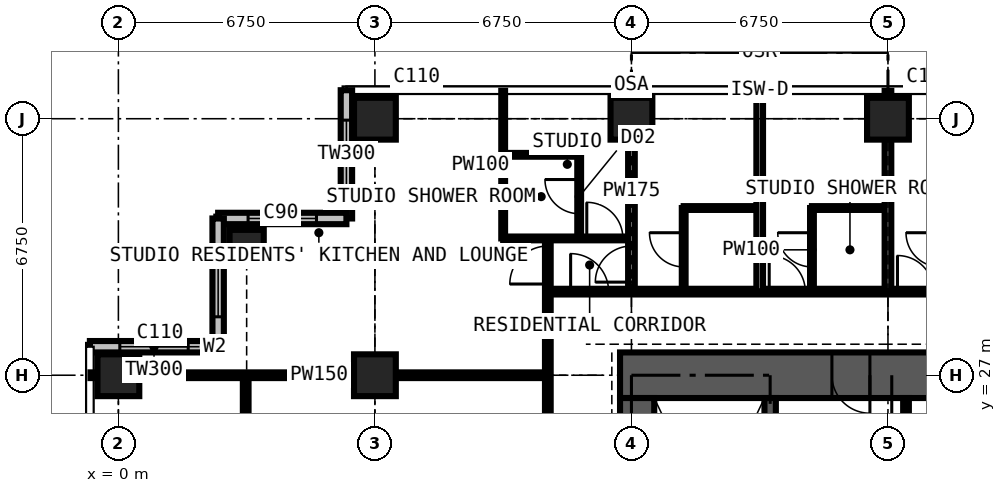
"""IFC4 building model, lengths in metres.
Left out: names, types, materials, properties, quantities, classifications, styles, units other than length and angle.
Written with IfcOpenShell. Run it as: python <this file> out.ifc"""

import sys

from ifc_helpers import new_model, si_unit, direction, frame, frame_2d, origin, origin_2d, place, context, subcontext, project, spatial, rectangle, extrude, element, fill, save


model = new_model("IFC4")
c1 = context("Model", 3, precision=1e-05, world=origin(), true_north=direction((0.0, 1.0)))
c2 = subcontext(c1, "Body", "Model", "MODEL_VIEW")
j1 = project(units=[si_unit("LENGTHUNIT", "METRE"), si_unit("PLANEANGLEUNIT", "RADIAN")], contexts=[c1])
p1 = place(None, origin())
s1 = spatial("IfcSite", under=j1, at=p1, CompositionType="ELEMENT")
p2 = place(p1, origin())
s2 = spatial("IfcBuilding", under=s1, at=p2, CompositionType="ELEMENT")
p3 = place(p2, frame((0.0, 0.0, 222.3)))
s3 = spatial("IfcBuildingStorey", under=s2, at=p3, CompositionType="ELEMENT", Elevation=222.3)
p4 = place(p3, frame((0.0, 27.0, 0.0), z_axis=(0.0, 0.0, 1.0), x_axis=(1.0, 0.0, 0.0)))
e1 = element("IfcColumn", 1, at=p4, inside=s3, PredefinedType="COLUMN", context=c2, shape_type="SweptSolid", body=[
    extrude(rectangle(XDim=1.1, YDim=1.1, at=origin_2d()), origin(), (0.0, 0.0, 1.0), 3.6),
])
p5 = place(p3, frame((3.375, 30.375, 0.0), z_axis=(0.0, 0.0, 1.0), x_axis=(1.0, 0.0, 0.0)))
e2 = element("IfcColumn", 2, at=p5, inside=s3, PredefinedType="COLUMN", context=c2, shape_type="SweptSolid", body=[
    extrude(rectangle(XDim=0.9, YDim=0.9, at=origin_2d()), origin(), (0.0, 0.0, 1.0), 3.6),
])
for number, where, z_axis, x_axis in (
    (3, (6.75, 27.0, 0.0), (0.0, 0.0, 1.0), (1.0, 0.0, 0.0)),
    (4, (6.75, 33.75, 0.0), (0.0, 0.0, 1.0), (1.0, 0.0, 0.0)),
    (5, (13.5, 33.75, 0.0), (0.0, 0.0, 1.0), (1.0, 0.0, 0.0)),
    (6, (20.25, 33.75, 0.0), (0.0, 0.0, 1.0), (1.0, 0.0, 0.0)),
):
    element("IfcColumn", number, at=place(p3, frame(where, z_axis=z_axis, x_axis=x_axis)), inside=s3, PredefinedType="COLUMN", context=c2, shape_type="SweptSolid", body=[
        extrude(rectangle(XDim=1.1, YDim=1.1, at=origin_2d()), origin(), (0.0, 0.0, 1.0), 3.6),
    ])
p6 = place(p3, frame((27.3, 27.0, 0.0), z_axis=(0.0, 0.0, 1.0), x_axis=(-1.0, 0.0, 0.0)))
e7 = element("IfcWall", 7, at=p6, inside=s3, PredefinedType="SHEAR", context=c2, shape_type="SweptSolid", body=[
    extrude(rectangle(XDim=14.1, YDim=1.2, at=frame_2d((7.05, 0.0))), origin(), (0.0, 0.0, 1.0), 3.6),
])
p7 = place(p6, frame((4.55, 0.0, 0.0)))
e8 = element("IfcOpeningElement", 8, at=p7, cuts=e7, PredefinedType="OPENING", context=c2, shape_type="SweptSolid", body=[
    extrude(rectangle(XDim=0.9, YDim=2.2, at=frame_2d((0.45, 1.1))), frame((0.0, 0.61, 0.0), z_axis=(0.0, -1.0, 0.0), x_axis=(1.0, 0.0, 0.0)), (0.0, 0.0, 1.0), 1.22),
])
p8 = place(p6, frame((7.525, 0.0, 0.0)))
e9 = element("IfcOpeningElement", 9, at=p8, cuts=e7, PredefinedType="OPENING", context=c2, shape_type="SweptSolid", body=[
    extrude(rectangle(XDim=1.0, YDim=2.2, at=frame_2d((0.5, 1.1))), frame((0.0, 0.61, 0.0), z_axis=(0.0, -1.0, 0.0), x_axis=(1.0, 0.0, 0.0)), (0.0, 0.0, 1.0), 1.22),
])
p9 = place(p3, frame((13.65, 26.4, 0.0), z_axis=(0.0, 0.0, 1.0), x_axis=(0.0, -1.0, 0.0)))
e10 = element("IfcWall", 10, at=p9, inside=s3, PredefinedType="SHEAR", context=c2, shape_type="SweptSolid", body=[
    extrude(rectangle(XDim=12.3, YDim=0.9, at=frame_2d((6.15, 0.0))), origin(), (0.0, 0.0, 1.0), 3.6),
])
p10 = place(p9, frame((7.45, 0.0, 0.0)))
e11 = element("IfcOpeningElement", 11, at=p10, cuts=e10, PredefinedType="OPENING", context=c2, shape_type="SweptSolid", body=[
    extrude(rectangle(XDim=1.2, YDim=2.2, at=frame_2d((0.6, 1.1))), frame((0.0, 0.46, 0.0), z_axis=(0.0, -1.0, 0.0), x_axis=(1.0, 0.0, 0.0)), (0.0, 0.0, 1.0), 0.92),
])
p11 = place(p3, frame((6.0, 34.5, 0.0), z_axis=(0.0, 0.0, 1.0), x_axis=(0.0, -1.0, 0.0)))
e12 = element("IfcWall", 12, at=p11, inside=s3, PredefinedType="SOLIDWALL", context=c2, shape_type="SweptSolid", body=[
    extrude(rectangle(XDim=3.375, YDim=0.3, at=frame_2d((1.688, 0.0))), origin(), (0.0, 0.0, 1.0), 3.375),
])
p12 = place(p11, frame((0.788, 0.0, 0.6)))
e13 = element("IfcOpeningElement", 13, at=p12, cuts=e12, PredefinedType="OPENING", context=c2, shape_type="SweptSolid", body=[
    extrude(rectangle(XDim=1.8, YDim=2.1, at=frame_2d((0.9, 1.05))), frame((0.0, 0.16, 0.0), z_axis=(0.0, -1.0, 0.0), x_axis=(1.0, 0.0, 0.0)), (0.0, 0.0, 1.0), 0.32),
])
p13 = place(p3, frame((6.0, 31.125, 0.0), z_axis=(0.0, 0.0, 1.0), x_axis=(-1.0, 0.0, 0.0)))
e14 = element("IfcWall", 14, at=p13, inside=s3, PredefinedType="SOLIDWALL", context=c2, shape_type="SweptSolid", body=[
    extrude(rectangle(XDim=3.375, YDim=0.3, at=frame_2d((1.688, 0.0))), origin(), (0.0, 0.0, 1.0), 3.375),
])
p14 = place(p13, frame((0.788, 0.0, 0.6)))
e15 = element("IfcOpeningElement", 15, at=p14, cuts=e14, PredefinedType="OPENING", context=c2, shape_type="SweptSolid", body=[
    extrude(rectangle(XDim=1.8, YDim=2.1, at=frame_2d((0.9, 1.05))), frame((0.0, 0.16, 0.0), z_axis=(0.0, -1.0, 0.0), x_axis=(1.0, 0.0, 0.0)), (0.0, 0.0, 1.0), 0.32),
])
p15 = place(p3, frame((2.625, 31.125, 0.0), z_axis=(0.0, 0.0, 1.0), x_axis=(0.0, -1.0, 0.0)))
e16 = element("IfcWall", 16, at=p15, inside=s3, PredefinedType="SOLIDWALL", context=c2, shape_type="SweptSolid", body=[
    extrude(rectangle(XDim=3.375, YDim=0.3, at=frame_2d((1.688, 0.0))), origin(), (0.0, 0.0, 1.0), 3.375),
])
p16 = place(p15, frame((0.788, 0.0, 0.6)))
e17 = element("IfcOpeningElement", 17, at=p16, cuts=e16, PredefinedType="OPENING", context=c2, shape_type="SweptSolid", body=[
    extrude(rectangle(XDim=1.8, YDim=2.1, at=frame_2d((0.9, 1.05))), frame((0.0, 0.16, 0.0), z_axis=(0.0, -1.0, 0.0), x_axis=(1.0, 0.0, 0.0)), (0.0, 0.0, 1.0), 0.32),
])
p17 = place(p3, frame((2.625, 27.75, 0.0), z_axis=(0.0, 0.0, 1.0), x_axis=(-1.0, 0.0, 0.0)))
e18 = element("IfcWall", 18, at=p17, inside=s3, PredefinedType="SOLIDWALL", context=c2, shape_type="SweptSolid", body=[
    extrude(rectangle(XDim=3.375, YDim=0.3, at=frame_2d((1.688, 0.0))), origin(), (0.0, 0.0, 1.0), 3.375),
])
p18 = place(p17, frame((0.788, 0.0, 0.6)))
e19 = element("IfcOpeningElement", 19, at=p18, cuts=e18, PredefinedType="OPENING", context=c2, shape_type="SweptSolid", body=[
    extrude(rectangle(XDim=1.8, YDim=2.1, at=frame_2d((0.9, 1.05))), frame((0.0, 0.16, 0.0), z_axis=(0.0, -1.0, 0.0), x_axis=(1.0, 0.0, 0.0)), (0.0, 0.0, 1.0), 0.32),
])
p19 = place(p3, frame((17.15, 20.3, 0.0), z_axis=(0.0, 0.0, 1.0), x_axis=(0.0, 1.0, 0.0)))
e20 = element("IfcWall", 20, at=p19, inside=s3, PredefinedType="SHEAR", context=c2, shape_type="SweptSolid", body=[
    extrude(rectangle(XDim=6.1, YDim=0.3, at=frame_2d((3.05, 0.0))), origin(), (0.0, 0.0, 1.0), 3.6),
])
p20 = place(p3, frame((20.725, 23.4, 0.0), z_axis=(0.0, 0.0, 1.0), x_axis=(0.0, 1.0, 0.0)))
e21 = element("IfcWall", 21, at=p20, inside=s3, PredefinedType="PARTITIONING", context=c2, shape_type="SweptSolid", body=[
    extrude(rectangle(XDim=3.0, YDim=0.15, at=frame_2d((1.5, 0.0))), origin(), (0.0, 0.0, 1.0), 3.375),
])
p21 = place(p3, frame((-0.734, 27.0, 0.0), z_axis=(0.0, 0.0, 1.0), x_axis=(1.0, 0.0, 0.0)))
e22 = element("IfcWall", 22, at=p21, inside=s3, PredefinedType="PARTITIONING", context=c2, shape_type="SweptSolid", body=[
    extrude(rectangle(XDim=12.034, YDim=0.15, at=frame_2d((6.017, 0.0))), origin(), (0.0, 0.0, 1.0), 2.877),
])
p22 = place(p3, frame((3.35, 13.5, 0.0), z_axis=(0.0, 0.0, 1.0), x_axis=(0.0, 1.0, 0.0)))
e23 = element("IfcWall", 23, at=p22, inside=s3, PredefinedType="PARTITIONING", context=c2, shape_type="SweptSolid", body=[
    extrude(rectangle(XDim=13.5, YDim=0.15, at=frame_2d((6.75, 0.0))), origin(), (0.0, 0.0, 1.0), 3.375),
])
p23 = place(p22, frame((4.2, 0.0, 0.0)))
e24 = element("IfcOpeningElement", 24, at=p23, cuts=e23, PredefinedType="OPENING", context=c2, shape_type="SweptSolid", body=[
    extrude(rectangle(XDim=0.95, YDim=2.2, at=frame_2d((0.475, 1.1))), frame((0.0, 0.085, 0.0), z_axis=(0.0, -1.0, 0.0), x_axis=(1.0, 0.0, 0.0)), (0.0, 0.0, 1.0), 0.17),
])
p24 = place(p22, frame((10.95, 0.0, 0.0)))
e25 = element("IfcOpeningElement", 25, at=p24, cuts=e23, PredefinedType="OPENING", context=c2, shape_type="SweptSolid", body=[
    extrude(rectangle(XDim=0.95, YDim=2.2, at=frame_2d((0.475, 1.1))), frame((0.0, 0.085, 0.0), z_axis=(0.0, -1.0, 0.0), x_axis=(1.0, 0.0, 0.0)), (0.0, 0.0, 1.0), 0.17),
])
p25 = place(p3, frame((10.125, 30.6, 0.0), z_axis=(0.0, 0.0, 1.0), x_axis=(0.0, 1.0, 0.0)))
e26 = element("IfcWall", 26, at=p25, inside=s3, PredefinedType="PARTITIONING", context=c2, shape_type="SweptSolid", body=[
    extrude(rectangle(XDim=3.884, YDim=0.1, at=frame_2d((1.942, 0.0))), origin(), (0.0, 0.0, 1.0), 3.375),
])
p26 = place(p3, frame((10.125, 30.6, 0.0), z_axis=(0.0, 0.0, 1.0), x_axis=(1.0, 0.0, 0.0)))
e27 = element("IfcWall", 27, at=p26, inside=s3, PredefinedType="PARTITIONING", context=c2, shape_type="SweptSolid", body=[
    extrude(rectangle(XDim=3.375, YDim=0.1, at=frame_2d((1.688, 0.0))), origin(), (0.0, 0.0, 1.0), 3.375),
])
p27 = place(p26, frame((2.2, 0.0, 0.0)))
e28 = element("IfcOpeningElement", 28, at=p27, cuts=e27, PredefinedType="OPENING", context=c2, shape_type="SweptSolid", body=[
    extrude(rectangle(XDim=0.95, YDim=2.2, at=frame_2d((0.475, 1.1))), frame((0.0, 0.06, 0.0), z_axis=(0.0, -1.0, 0.0), x_axis=(1.0, 0.0, 0.0)), (0.0, 0.0, 1.0), 0.12),
])
p28 = place(p3, frame((10.125, 32.8, 0.0), z_axis=(0.0, 0.0, 1.0), x_axis=(1.0, 0.0, 0.0)))
e29 = element("IfcWall", 29, at=p28, inside=s3, PredefinedType="PARTITIONING", context=c2, shape_type="SweptSolid", body=[
    extrude(rectangle(XDim=2.0, YDim=0.1, at=frame_2d((1.0, 0.0))), origin(), (0.0, 0.0, 1.0), 3.375),
])
p29 = place(p3, frame((11.3, 11.3, 0.0), z_axis=(0.0, 0.0, 1.0), x_axis=(0.0, 1.0, 0.0)))
e30 = element("IfcWall", 30, at=p29, inside=s3, PredefinedType="PARTITIONING", context=c2, shape_type="SweptSolid", body=[
    extrude(rectangle(XDim=19.3, YDim=0.15, at=frame_2d((9.65, 0.0))), origin(), (0.0, 0.0, 1.0), 3.375),
])
p30 = place(p29, frame((18.1, 0.0, 0.0)))
e31 = element("IfcOpeningElement", 31, at=p30, cuts=e30, PredefinedType="OPENING", context=c2, shape_type="SweptSolid", body=[
    extrude(rectangle(XDim=1.0, YDim=2.2, at=frame_2d((0.5, 1.1))), frame((0.0, 0.085, 0.0), z_axis=(0.0, -1.0, 0.0), x_axis=(1.0, 0.0, 0.0)), (0.0, 0.0, 1.0), 0.17),
])
p31 = place(p29, frame((12.137, 0.0, 0.0)))
e32 = element("IfcOpeningElement", 32, at=p31, cuts=e30, PredefinedType="OPENING", context=c2, shape_type="SweptSolid", body=[
    extrude(rectangle(XDim=1.0, YDim=2.2, at=frame_2d((0.5, 1.1))), frame((0.0, 0.085, 0.0), z_axis=(0.0, -1.0, 0.0), x_axis=(1.0, 0.0, 0.0)), (0.0, 0.0, 1.0), 0.17),
])
p32 = place(p3, frame((11.3, 29.2, 0.0), z_axis=(0.0, 0.0, 1.0), x_axis=(1.0, 0.0, 0.0)))
e33 = element("IfcWall", 33, at=p32, inside=s3, PredefinedType="PARTITIONING", context=c2, shape_type="SweptSolid", body=[
    extrude(rectangle(XDim=19.809, YDim=0.15, at=frame_2d((9.904, 0.0))), origin(), (0.0, 0.0, 1.0), 3.375),
])
p33 = place(p32, frame((16.3, 0.0, 0.0)))
e34 = element("IfcOpeningElement", 34, at=p33, cuts=e33, PredefinedType="OPENING", context=c2, shape_type="SweptSolid", body=[
    extrude(rectangle(XDim=1.0, YDim=2.2, at=frame_2d((0.5, 1.1))), frame((0.0, 0.085, 0.0), z_axis=(0.0, -1.0, 0.0), x_axis=(1.0, 0.0, 0.0)), (0.0, 0.0, 1.0), 0.17),
])
p34 = place(p32, frame((5.825, 0.0, 0.0)))
e35 = element("IfcOpeningElement", 35, at=p34, cuts=e33, PredefinedType="OPENING", context=c2, shape_type="SweptSolid", body=[
    extrude(rectangle(XDim=0.95, YDim=2.2, at=frame_2d((0.475, 1.1))), frame((0.0, 0.085, 0.0), z_axis=(0.0, -1.0, 0.0), x_axis=(1.0, 0.0, 0.0)), (0.0, 0.0, 1.0), 0.17),
])
p35 = place(p32, frame((9.2, 0.0, 0.0)))
e36 = element("IfcOpeningElement", 36, at=p35, cuts=e33, PredefinedType="OPENING", context=c2, shape_type="SweptSolid", body=[
    extrude(rectangle(XDim=0.95, YDim=2.2, at=frame_2d((0.475, 1.1))), frame((0.0, 0.085, 0.0), z_axis=(0.0, -1.0, 0.0), x_axis=(1.0, 0.0, 0.0)), (0.0, 0.0, 1.0), 0.17),
])
p36 = place(p32, frame((12.575, 0.0, 0.0)))
e37 = element("IfcOpeningElement", 37, at=p36, cuts=e33, PredefinedType="OPENING", context=c2, shape_type="SweptSolid", body=[
    extrude(rectangle(XDim=0.95, YDim=2.2, at=frame_2d((0.475, 1.1))), frame((0.0, 0.085, 0.0), z_axis=(0.0, -1.0, 0.0), x_axis=(1.0, 0.0, 0.0)), (0.0, 0.0, 1.0), 0.17),
])
p37 = place(p32, frame((0.6, 0.0, 0.0)))
e38 = element("IfcOpeningElement", 38, at=p37, cuts=e33, PredefinedType="OPENING", context=c2, shape_type="SweptSolid", body=[
    extrude(rectangle(XDim=1.0, YDim=2.2, at=frame_2d((0.5, 1.1))), frame((0.0, 0.085, 0.0), z_axis=(0.0, -1.0, 0.0), x_axis=(1.0, 0.0, 0.0)), (0.0, 0.0, 1.0), 0.17),
])
p38 = place(p3, frame((12.125, 30.6, 0.0), z_axis=(0.0, 0.0, 1.0), x_axis=(0.0, 1.0, 0.0)))
e39 = element("IfcWall", 39, at=p38, inside=s3, PredefinedType="PARTITIONING", context=c2, shape_type="SweptSolid", body=[
    extrude(rectangle(XDim=2.2, YDim=0.1, at=frame_2d((1.1, 0.0))), origin(), (0.0, 0.0, 1.0), 3.375),
])
p39 = place(p38, frame((0.65, 0.0, 0.0)))
e40 = element("IfcOpeningElement", 40, at=p39, cuts=e39, PredefinedType="OPENING", context=c2, shape_type="SweptSolid", body=[
    extrude(rectangle(XDim=0.9, YDim=2.2, at=frame_2d((0.45, 1.1))), frame((0.0, 0.06, 0.0), z_axis=(0.0, -1.0, 0.0), x_axis=(1.0, 0.0, 0.0)), (0.0, 0.0, 1.0), 0.12),
])
p40 = place(p3, frame((13.5, 29.2, 0.0), z_axis=(0.0, 0.0, 1.0), x_axis=(0.0, 1.0, 0.0)))
e41 = element("IfcWall", 41, at=p40, inside=s3, PredefinedType="PARTITIONING", context=c2, shape_type="SweptSolid", body=[
    extrude(rectangle(XDim=5.284, YDim=0.175, at=frame_2d((2.642, 0.0))), origin(), (0.0, 0.0, 1.0), 2.61),
])
p41 = place(p40, frame((0.25, 0.0, 0.0)))
e42 = element("IfcOpeningElement", 42, at=p41, cuts=e41, PredefinedType="OPENING", context=c2, shape_type="SweptSolid", body=[
    extrude(rectangle(XDim=0.95, YDim=2.2, at=frame_2d((0.475, 1.1))), frame((0.0, 0.097, 0.0), z_axis=(0.0, -1.0, 0.0), x_axis=(1.0, 0.0, 0.0)), (0.0, 0.0, 1.0), 0.195),
])
p42 = place(p3, frame((14.875, 29.2, 0.0), z_axis=(0.0, 0.0, 1.0), x_axis=(0.0, 1.0, 0.0)))
e43 = element("IfcWall", 43, at=p42, inside=s3, PredefinedType="PARTITIONING", context=c2, shape_type="SweptSolid", body=[
    extrude(rectangle(XDim=2.2, YDim=0.1, at=frame_2d((1.1, 0.0))), origin(), (0.0, 0.0, 1.0), 3.375),
])
p43 = place(p42, frame((0.65, 0.0, 0.0)))
e44 = element("IfcOpeningElement", 44, at=p43, cuts=e43, PredefinedType="OPENING", context=c2, shape_type="SweptSolid", body=[
    extrude(rectangle(XDim=0.9, YDim=2.2, at=frame_2d((0.45, 1.1))), frame((0.0, 0.06, 0.0), z_axis=(0.0, -1.0, 0.0), x_axis=(1.0, 0.0, 0.0)), (0.0, 0.0, 1.0), 0.12),
])
p44 = place(p3, frame((14.875, 31.4, 0.0), z_axis=(0.0, 0.0, 1.0), x_axis=(1.0, 0.0, 0.0)))
e45 = element("IfcWall", 45, at=p44, inside=s3, PredefinedType="PARTITIONING", context=c2, shape_type="SweptSolid", body=[
    extrude(rectangle(XDim=2.0, YDim=0.1, at=frame_2d((1.0, 0.0))), origin(), (0.0, 0.0, 1.0), 3.375),
])
p45 = place(p3, frame((16.875, 29.2, 0.0), z_axis=(0.0, 0.0, 1.0), x_axis=(0.0, 1.0, 0.0)))
e46 = element("IfcWall", 46, at=p45, inside=s3, PredefinedType="PARTITIONING", context=c2, shape_type="SweptSolid", body=[
    extrude(rectangle(XDim=5.284, YDim=0.175, at=frame_2d((2.642, 0.0))), origin(), (0.0, 0.0, 1.0), 3.375),
])
p46 = place(p3, frame((18.25, 29.2, 0.0), z_axis=(0.0, 0.0, 1.0), x_axis=(0.0, 1.0, 0.0)))
e47 = element("IfcWall", 47, at=p46, inside=s3, PredefinedType="PARTITIONING", context=c2, shape_type="SweptSolid", body=[
    extrude(rectangle(XDim=2.2, YDim=0.1, at=frame_2d((1.1, 0.0))), origin(), (0.0, 0.0, 1.0), 3.375),
])
p47 = place(p46, frame((0.65, 0.0, 0.0)))
e48 = element("IfcOpeningElement", 48, at=p47, cuts=e47, PredefinedType="OPENING", context=c2, shape_type="SweptSolid", body=[
    extrude(rectangle(XDim=0.9, YDim=2.2, at=frame_2d((0.45, 1.1))), frame((0.0, 0.06, 0.0), z_axis=(0.0, -1.0, 0.0), x_axis=(1.0, 0.0, 0.0)), (0.0, 0.0, 1.0), 0.12),
])
p48 = place(p3, frame((18.25, 31.4, 0.0), z_axis=(0.0, 0.0, 1.0), x_axis=(1.0, 0.0, 0.0)))
e49 = element("IfcWall", 49, at=p48, inside=s3, PredefinedType="PARTITIONING", context=c2, shape_type="SweptSolid", body=[
    extrude(rectangle(XDim=2.0, YDim=0.1, at=frame_2d((1.0, 0.0))), origin(), (0.0, 0.0, 1.0), 3.375),
])
p49 = place(p3, frame((20.25, 29.2, 0.0), z_axis=(0.0, 0.0, 1.0), x_axis=(0.0, 1.0, 0.0)))
e50 = element("IfcWall", 50, at=p49, inside=s3, PredefinedType="PARTITIONING", context=c2, shape_type="SweptSolid", body=[
    extrude(rectangle(XDim=5.284, YDim=0.175, at=frame_2d((2.642, 0.0))), origin(), (0.0, 0.0, 1.0), 2.61),
])
p50 = place(p12, origin())
e51 = element("IfcWindow", 51, at=p50, inside=s3, PartitioningType="SINGLE_PANEL", PredefinedType="WINDOW", context=c2, shape_type="SweptSolid", body=[
    extrude(rectangle(XDim=1.8, YDim=2.1, at=frame_2d((0.9, 1.05))), frame((0.0, 0.03, 0.0), z_axis=(0.0, -1.0, 0.0), x_axis=(1.0, 0.0, 0.0)), (0.0, 0.0, 1.0), 0.06),
])
fill(e13, e51)
p51 = place(p14, origin())
e52 = element("IfcWindow", 52, at=p51, inside=s3, PartitioningType="SINGLE_PANEL", PredefinedType="WINDOW", context=c2, shape_type="SweptSolid", body=[
    extrude(rectangle(XDim=1.8, YDim=2.1, at=frame_2d((0.9, 1.05))), frame((0.0, 0.03, 0.0), z_axis=(0.0, -1.0, 0.0), x_axis=(1.0, 0.0, 0.0)), (0.0, 0.0, 1.0), 0.06),
])
fill(e15, e52)
p52 = place(p16, origin())
e53 = element("IfcWindow", 53, at=p52, inside=s3, PartitioningType="SINGLE_PANEL", PredefinedType="WINDOW", context=c2, shape_type="SweptSolid", body=[
    extrude(rectangle(XDim=1.8, YDim=2.1, at=frame_2d((0.9, 1.05))), frame((0.0, 0.03, 0.0), z_axis=(0.0, -1.0, 0.0), x_axis=(1.0, 0.0, 0.0)), (0.0, 0.0, 1.0), 0.06),
])
fill(e17, e53)
p53 = place(p18, origin())
e54 = element("IfcWindow", 54, at=p53, inside=s3, PartitioningType="SINGLE_PANEL", PredefinedType="WINDOW", context=c2, shape_type="SweptSolid", body=[
    extrude(rectangle(XDim=1.8, YDim=2.1, at=frame_2d((0.9, 1.05))), frame((0.0, 0.03, 0.0), z_axis=(0.0, -1.0, 0.0), x_axis=(1.0, 0.0, 0.0)), (0.0, 0.0, 1.0), 0.06),
])
fill(e19, e54)
p54 = place(p8, origin())
e55 = element("IfcDoor", 55, at=p54, inside=s3, OperationType="SINGLE_SWING_LEFT", PredefinedType="DOOR", context=c2, shape_type="SweptSolid", body=[
    extrude(rectangle(XDim=1.0, YDim=2.2, at=frame_2d((0.5, 1.1))), frame((0.0, 0.025, 0.0), z_axis=(0.0, -1.0, 0.0), x_axis=(1.0, 0.0, 0.0)), (0.0, 0.0, 1.0), 0.05),
])
fill(e9, e55)
p55 = place(p27, origin())
e56 = element("IfcDoor", 56, at=p55, inside=s3, OperationType="SINGLE_SWING_LEFT", PredefinedType="DOOR", context=c2, shape_type="SweptSolid", body=[
    extrude(rectangle(XDim=0.95, YDim=2.2, at=frame_2d((0.475, 1.1))), frame((0.0, 0.025, 0.0), z_axis=(0.0, -1.0, 0.0), x_axis=(1.0, 0.0, 0.0)), (0.0, 0.0, 1.0), 0.05),
])
fill(e28, e56)
p56 = place(p39, origin())
e57 = element("IfcDoor", 57, at=p56, inside=s3, OperationType="SINGLE_SWING_RIGHT", PredefinedType="DOOR", context=c2, shape_type="SweptSolid", body=[
    extrude(rectangle(XDim=0.9, YDim=2.2, at=frame_2d((0.45, 1.1))), frame((0.0, 0.025, 0.0), z_axis=(0.0, -1.0, 0.0), x_axis=(1.0, 0.0, 0.0)), (0.0, 0.0, 1.0), 0.05),
])
fill(e40, e57)
p57 = place(p41, origin())
e58 = element("IfcDoor", 58, at=p57, inside=s3, OperationType="SINGLE_SWING_LEFT", PredefinedType="DOOR", context=c2, shape_type="SweptSolid", body=[
    extrude(rectangle(XDim=0.95, YDim=2.2, at=frame_2d((0.475, 1.1))), frame((0.0, 0.025, 0.0), z_axis=(0.0, -1.0, 0.0), x_axis=(1.0, 0.0, 0.0)), (0.0, 0.0, 1.0), 0.05),
])
fill(e42, e58)
p58 = place(p43, origin())
e59 = element("IfcDoor", 59, at=p58, inside=s3, OperationType="SINGLE_SWING_RIGHT", PredefinedType="DOOR", context=c2, shape_type="SweptSolid", body=[
    extrude(rectangle(XDim=0.9, YDim=2.2, at=frame_2d((0.45, 1.1))), frame((0.0, 0.025, 0.0), z_axis=(0.0, -1.0, 0.0), x_axis=(1.0, 0.0, 0.0)), (0.0, 0.0, 1.0), 0.05),
])
fill(e44, e59)
p59 = place(p34, origin())
e60 = element("IfcDoor", 60, at=p59, inside=s3, OperationType="SINGLE_SWING_LEFT", PredefinedType="DOOR", context=c2, shape_type="SweptSolid", body=[
    extrude(rectangle(XDim=0.95, YDim=2.2, at=frame_2d((0.475, 1.1))), frame((0.0, 0.025, 0.0), z_axis=(0.0, -1.0, 0.0), x_axis=(1.0, 0.0, 0.0)), (0.0, 0.0, 1.0), 0.05),
])
fill(e35, e60)
p60 = place(p47, origin())
e61 = element("IfcDoor", 61, at=p60, inside=s3, OperationType="SINGLE_SWING_RIGHT", PredefinedType="DOOR", context=c2, shape_type="SweptSolid", body=[
    extrude(rectangle(XDim=0.9, YDim=2.2, at=frame_2d((0.45, 1.1))), frame((0.0, 0.025, 0.0), z_axis=(0.0, -1.0, 0.0), x_axis=(1.0, 0.0, 0.0)), (0.0, 0.0, 1.0), 0.05),
])
fill(e48, e61)
p61 = place(p35, origin())
e62 = element("IfcDoor", 62, at=p61, inside=s3, OperationType="SINGLE_SWING_LEFT", PredefinedType="DOOR", context=c2, shape_type="SweptSolid", body=[
    extrude(rectangle(XDim=0.95, YDim=2.2, at=frame_2d((0.475, 1.1))), frame((0.0, 0.025, 0.0), z_axis=(0.0, -1.0, 0.0), x_axis=(1.0, 0.0, 0.0)), (0.0, 0.0, 1.0), 0.05),
])
fill(e36, e62)
p62 = place(p37, origin())
e63 = element("IfcDoor", 63, at=p62, inside=s3, OperationType="SINGLE_SWING_LEFT", PredefinedType="DOOR", context=c2, shape_type="SweptSolid", body=[
    extrude(rectangle(XDim=1.0, YDim=2.2, at=frame_2d((0.5, 1.1))), frame((0.0, 0.025, 0.0), z_axis=(0.0, -1.0, 0.0), x_axis=(1.0, 0.0, 0.0)), (0.0, 0.0, 1.0), 0.05),
])
fill(e38, e63)
p63 = place(p30, origin())
e64 = element("IfcDoor", 64, at=p63, inside=s3, OperationType="SINGLE_SWING_LEFT", PredefinedType="DOOR", context=c2, shape_type="SweptSolid", body=[
    extrude(rectangle(XDim=1.0, YDim=2.2, at=frame_2d((0.5, 1.1))), frame((0.0, 0.025, 0.0), z_axis=(0.0, -1.0, 0.0), x_axis=(1.0, 0.0, 0.0)), (0.0, 0.0, 1.0), 0.05),
])
fill(e31, e64)
save(model, sys.argv[1])
